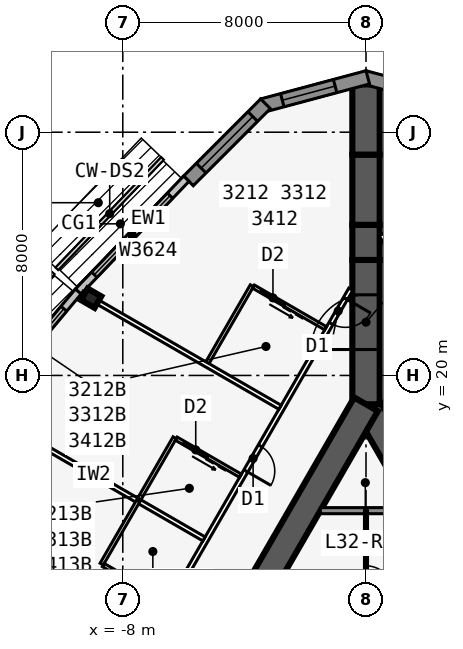
"""IFC4 building model, lengths in metres.
Left out: names, types, materials, properties, quantities, classifications, styles, units other than length and angle.
Written with IfcOpenShell. Run it as: python <this file> out.ifc"""

import sys

from ifc_helpers import new_model, si_unit, direction, frame, frame_2d, origin, origin_2d, place, context, subcontext, project, spatial, polyline, rectangle, i_section, outline, extrude, element, fill, save


model = new_model("IFC4")
c1 = context("Model", 3, precision=1e-05, world=origin(), true_north=direction((0.0, 1.0)))
c2 = subcontext(c1, "Body", "Model", "MODEL_VIEW")
j1 = project(units=[si_unit("LENGTHUNIT", "METRE"), si_unit("PLANEANGLEUNIT", "RADIAN")], contexts=[c1])
p1 = place(None, origin())
s1 = spatial("IfcSite", under=j1, at=p1, CompositionType="ELEMENT")
p2 = place(p1, origin())
s2 = spatial("IfcBuilding", under=s1, at=p2, CompositionType="ELEMENT")
p3 = place(p2, frame((0.0, 0.0, 124.9)))
s3 = spatial("IfcBuildingStorey", under=s2, at=p3, CompositionType="ELEMENT", Elevation=124.9)
p4 = place(p3, frame((16.5, -9.526, 0.0), z_axis=(0.0, 0.0, 1.0), x_axis=(-0.499999749417, 0.866025548458, 0.0)))
e1 = element("IfcWall", 1, at=p4, inside=s3, PredefinedType="SHEAR", context=c2, shape_type="SweptSolid", body=[
    extrude(rectangle(XDim=33.0, YDim=0.9, at=frame_2d((16.5, 0.0))), origin(), (0.0, 0.0, 1.0), 3.4),
])
p5 = place(p4, frame((14.15, 0.0, 0.0)))
e2 = element("IfcOpeningElement", 2, at=p5, cuts=e1, PredefinedType="OPENING", context=c2, shape_type="SweptSolid", body=[
    extrude(rectangle(XDim=1.8, YDim=2.13, at=frame_2d((0.9, 1.065))), frame((0.0, 0.46, 0.0), z_axis=(0.0, -1.0, 0.0), x_axis=(1.0, 0.0, 0.0)), (0.0, 0.0, 1.0), 0.92),
])
p6 = place(p4, frame((12.6, 0.0, 0.0)))
e3 = element("IfcOpeningElement", 3, at=p6, cuts=e1, PredefinedType="OPENING", context=c2, shape_type="SweptSolid", body=[
    extrude(rectangle(XDim=1.0, YDim=2.13, at=frame_2d((0.5, 1.065))), frame((0.0, 0.46, 0.0), z_axis=(0.0, -1.0, 0.0), x_axis=(1.0, 0.0, 0.0)), (0.0, 0.0, 1.0), 0.92),
])
p7 = place(p3, frame((0.0, 19.052, 0.0), z_axis=(0.0, 0.0, 1.0), x_axis=(-0.499999749417, -0.866025548458, 0.0)))
e4 = element("IfcWall", 4, at=p7, inside=s3, PredefinedType="SHEAR", context=c2, shape_type="SweptSolid", body=[
    extrude(rectangle(XDim=33.0, YDim=0.9, at=frame_2d((16.5, 0.0))), origin(), (0.0, 0.0, 1.0), 3.4),
])
p8 = place(p7, frame((14.15, 0.0, 0.0)))
e5 = element("IfcOpeningElement", 5, at=p8, cuts=e4, PredefinedType="OPENING", context=c2, shape_type="SweptSolid", body=[
    extrude(rectangle(XDim=1.8, YDim=2.13, at=frame_2d((0.9, 1.065))), frame((0.0, 0.46, 0.0), z_axis=(0.0, -1.0, 0.0), x_axis=(1.0, 0.0, 0.0)), (0.0, 0.0, 1.0), 0.92),
])
p9 = place(p7, frame((12.6, 0.0, 0.0)))
e6 = element("IfcOpeningElement", 6, at=p9, cuts=e4, PredefinedType="OPENING", context=c2, shape_type="SweptSolid", body=[
    extrude(rectangle(XDim=1.0, YDim=2.13, at=frame_2d((0.5, 1.065))), frame((0.0, 0.46, 0.0), z_axis=(0.0, -1.0, 0.0), x_axis=(1.0, 0.0, 0.0)), (0.0, 0.0, 1.0), 0.92),
])
p10 = place(p3, frame((0.0, 19.052, 0.0), z_axis=(0.0, 0.0, 1.0), x_axis=(0.0, 1.0, 0.0)))
e7 = element("IfcWall", 7, at=p10, inside=s3, PredefinedType="SHEAR", context=c2, shape_type="SweptSolid", body=[
    extrude(rectangle(XDim=4.746, YDim=0.9, at=frame_2d((2.373, 0.0))), origin(), (0.0, 0.0, 1.0), 3.4),
])
p11 = place(p10, frame((1.8, 0.0, 0.0)))
e8 = element("IfcOpeningElement", 8, at=p11, cuts=e7, PredefinedType="OPENING", context=c2, shape_type="SweptSolid", body=[
    extrude(rectangle(XDim=1.8, YDim=2.13, at=frame_2d((0.9, 1.065))), frame((0.0, 0.46, 0.0), z_axis=(0.0, -1.0, 0.0), x_axis=(1.0, 0.0, 0.0)), (0.0, 0.0, 1.0), 0.92),
])
p12 = place(p3, frame((0.0, 23.799, 0.0), z_axis=(0.0, 0.0, 1.0), x_axis=(0.0, 1.0, 0.0)))
e9 = element("IfcWall", 9, at=p12, inside=s3, PredefinedType="SHEAR", context=c2, shape_type="SweptSolid", body=[
    extrude(rectangle(XDim=1.155, YDim=0.9, at=frame_2d((0.577, 0.0))), origin(), (0.0, 0.0, 1.0), 3.4),
])
p13 = place(p3, frame((0.0, 24.953, 0.0), z_axis=(0.0, 0.0, 1.0), x_axis=(0.0, 1.0, 0.0)))
e10 = element("IfcWall", 10, at=p13, inside=s3, PredefinedType="SHEAR", context=c2, shape_type="SweptSolid", body=[
    extrude(rectangle(XDim=2.309, YDim=0.9, at=frame_2d((1.155, 0.0))), origin(), (0.0, 0.0, 1.0), 3.4),
])
p14 = place(p3, frame((0.0, 27.263, 0.0), z_axis=(0.0, 0.0, 1.0), x_axis=(0.0, 1.0, 0.0)))
e11 = element("IfcWall", 11, at=p14, inside=s3, PredefinedType="SHEAR", context=c2, shape_type="SweptSolid", body=[
    extrude(rectangle(XDim=2.31, YDim=0.9, at=frame_2d((1.155, 0.0))), origin(), (0.0, 0.0, 1.0), 3.4),
])
p15 = place(p3, frame((-9.041, 22.541, 0.0), z_axis=(0.0, 0.0, 1.0), x_axis=(-0.5, -0.866025403784, 0.0)))
e12 = element("IfcColumn", 12, at=p15, inside=s3, PredefinedType="COLUMN", context=c2, shape_type="SweptSolid", body=[
    extrude(i_section(OverallWidth=0.437, OverallDepth=0.513, WebThickness=0.061, FlangeThickness=0.097, at=origin_2d()), origin(), (0.0, 0.0, 1.0), 3.4),
])
p16 = place(p3, frame((3.406, 28.877, 0.0), z_axis=(0.0, 0.0, 1.0), x_axis=(-0.965924653531, 0.258823421857, 0.0)))
e13 = element("IfcWall", 13, at=p16, inside=s3, PredefinedType="SOLIDWALL", context=c2, shape_type="SweptSolid", body=[
    extrude(outline(polyline([(3.586, 0.225), (3.527, 0.225), (3.035, 0.093), (3.0, 0.225), (0.0, 0.225), (0.0, -0.225), (3.586, -0.225), (3.586, 0.225)])), origin(), (0.0, 0.0, 1.0), 3.235),
])
p17 = place(p16, frame((0.675, 0.0, 0.45)))
e14 = element("IfcOpeningElement", 14, at=p17, cuts=e13, PredefinedType="OPENING", context=c2, shape_type="SweptSolid", body=[
    extrude(rectangle(XDim=1.8, YDim=2.4, at=frame_2d((0.9, 1.2))), frame((0.0, 0.235, 0.0), z_axis=(0.0, -1.0, 0.0), x_axis=(1.0, 0.0, 0.0)), (0.0, 0.0, 1.0), 0.47),
])
p18 = place(p3, frame((0.058, 29.805, 0.0), z_axis=(0.0, 0.0, 1.0), x_axis=(-0.965924653531, -0.258823421857, 0.0)))
e15 = element("IfcWall", 15, at=p18, inside=s3, PredefinedType="SOLIDWALL", context=c2, shape_type="SweptSolid", body=[
    extrude(outline(polyline([(3.586, 0.225), (0.586, 0.225), (0.551, 0.093), (0.06, 0.225), (0.0, 0.225), (0.0, -0.225), (3.586, -0.225), (3.586, 0.225)])), origin(), (0.0, 0.0, 1.0), 3.235),
])
p19 = place(p18, frame((1.111, 0.0, 0.45)))
e16 = element("IfcOpeningElement", 16, at=p19, cuts=e15, PredefinedType="OPENING", context=c2, shape_type="SweptSolid", body=[
    extrude(rectangle(XDim=1.8, YDim=2.4, at=frame_2d((0.9, 1.2))), frame((0.0, 0.235, 0.0), z_axis=(0.0, -1.0, 0.0), x_axis=(1.0, 0.0, 0.0)), (0.0, 0.0, 1.0), 0.47),
])
p20 = place(p3, frame((-3.305, 28.935, 0.0), z_axis=(0.0, 0.0, 1.0), x_axis=(-0.707106781187, -0.707106781187, 0.0)))
e17 = element("IfcWall", 17, at=p20, inside=s3, PredefinedType="SOLIDWALL", context=c2, shape_type="SweptSolid", body=[
    extrude(rectangle(XDim=3.586, YDim=0.45, at=frame_2d((1.793, 0.0))), origin(), (0.0, 0.0, 1.0), 3.235),
])
p21 = place(p20, frame((0.593, 0.0, 0.45)))
e18 = element("IfcOpeningElement", 18, at=p21, cuts=e17, PredefinedType="OPENING", context=c2, shape_type="SweptSolid", body=[
    extrude(rectangle(XDim=2.4, YDim=2.4, at=frame_2d((1.2, 1.2))), frame((0.0, 0.235, 0.0), z_axis=(0.0, -1.0, 0.0), x_axis=(1.0, 0.0, 0.0)), (0.0, 0.0, 1.0), 0.47),
])
p22 = place(p3, frame((-5.91, 26.472, 0.0), z_axis=(0.0, 0.0, 1.0), x_axis=(-0.691719937936, -0.722165858693, 0.0)))
e19 = element("IfcWall", 19, at=p22, inside=s3, PredefinedType="STANDARD", context=c2, shape_type="SweptSolid", body=[
    extrude(rectangle(XDim=5.148, YDim=0.25, at=frame_2d((2.574, 0.0))), origin(), (0.0, 0.0, 1.0), 3.235),
])
p23 = place(p22, frame((0.774, 0.0, 0.45)))
e20 = element("IfcOpeningElement", 20, at=p23, cuts=e19, PredefinedType="OPENING", context=c2, shape_type="SweptSolid", body=[
    extrude(rectangle(XDim=3.6, YDim=2.4, at=frame_2d((1.8, 1.2))), frame((0.0, 0.135, 0.0), z_axis=(0.0, -1.0, 0.0), x_axis=(1.0, 0.0, 0.0)), (0.0, 0.0, 1.0), 0.27),
])
p24 = place(p3, frame((-9.465, 22.76, 0.0), z_axis=(0.0, 0.0, 1.0), x_axis=(-0.641810386606, -0.766863369607, 0.0)))
e21 = element("IfcWall", 21, at=p24, inside=s3, PredefinedType="STANDARD", context=c2, shape_type="SweptSolid", body=[
    extrude(rectangle(XDim=5.076, YDim=0.25, at=frame_2d((2.538, 0.0))), origin(), (0.0, 0.0, 1.0), 3.235),
])
p25 = place(p24, frame((0.738, 0.0, 0.45)))
e22 = element("IfcOpeningElement", 22, at=p25, cuts=e21, PredefinedType="OPENING", context=c2, shape_type="SweptSolid", body=[
    extrude(rectangle(XDim=3.6, YDim=2.4, at=frame_2d((1.8, 1.2))), frame((0.0, 0.135, 0.0), z_axis=(0.0, -1.0, 0.0), x_axis=(1.0, 0.0, 0.0)), (0.0, 0.0, 1.0), 0.27),
])
p26 = place(p3, frame((21.586, -11.885, 0.0), z_axis=(0.0, 0.0, 1.0), x_axis=(-0.500001915564, 0.86602429783, 0.0)))
e23 = element("IfcWall", 23, at=p26, inside=s3, PredefinedType="PARTITIONING", context=c2, shape_type="SweptSolid", body=[
    extrude(rectangle(XDim=42.172, YDim=0.15, at=frame_2d((21.086, 0.0))), origin(), (0.0, 0.0, 1.0), 3.235),
])
p27 = place(p26, frame((1.911, 0.0, 0.0)))
e24 = element("IfcOpeningElement", 24, at=p27, cuts=e23, PredefinedType="OPENING", context=c2, shape_type="SweptSolid", body=[
    extrude(rectangle(XDim=0.95, YDim=2.13, at=frame_2d((0.475, 1.065))), frame((0.0, 0.085, 0.0), z_axis=(0.0, -1.0, 0.0), x_axis=(1.0, 0.0, 0.0)), (0.0, 0.0, 1.0), 0.17),
])
p28 = place(p26, frame((7.511, 0.0, 0.0)))
e25 = element("IfcOpeningElement", 25, at=p28, cuts=e23, PredefinedType="OPENING", context=c2, shape_type="SweptSolid", body=[
    extrude(rectangle(XDim=0.95, YDim=2.13, at=frame_2d((0.475, 1.065))), frame((0.0, 0.085, 0.0), z_axis=(0.0, -1.0, 0.0), x_axis=(1.0, 0.0, 0.0)), (0.0, 0.0, 1.0), 0.17),
])
p29 = place(p26, frame((14.311, 0.0, 0.0)))
e26 = element("IfcOpeningElement", 26, at=p29, cuts=e23, PredefinedType="OPENING", context=c2, shape_type="SweptSolid", body=[
    extrude(rectangle(XDim=0.95, YDim=2.13, at=frame_2d((0.475, 1.065))), frame((0.0, 0.085, 0.0), z_axis=(0.0, -1.0, 0.0), x_axis=(1.0, 0.0, 0.0)), (0.0, 0.0, 1.0), 0.17),
])
p30 = place(p26, frame((22.511, 0.0, 0.0)))
e27 = element("IfcOpeningElement", 27, at=p30, cuts=e23, PredefinedType="OPENING", context=c2, shape_type="SweptSolid", body=[
    extrude(rectangle(XDim=0.95, YDim=2.13, at=frame_2d((0.475, 1.065))), frame((0.0, 0.085, 0.0), z_axis=(0.0, -1.0, 0.0), x_axis=(1.0, 0.0, 0.0)), (0.0, 0.0, 1.0), 0.17),
])
p31 = place(p26, frame((29.311, 0.0, 0.0)))
e28 = element("IfcOpeningElement", 28, at=p31, cuts=e23, PredefinedType="OPENING", context=c2, shape_type="SweptSolid", body=[
    extrude(rectangle(XDim=0.95, YDim=2.13, at=frame_2d((0.475, 1.065))), frame((0.0, 0.085, 0.0), z_axis=(0.0, -1.0, 0.0), x_axis=(1.0, 0.0, 0.0)), (0.0, 0.0, 1.0), 0.17),
])
p32 = place(p26, frame((39.311, 0.0, 0.0)))
e29 = element("IfcOpeningElement", 29, at=p32, cuts=e23, PredefinedType="OPENING", context=c2, shape_type="SweptSolid", body=[
    extrude(rectangle(XDim=0.95, YDim=2.13, at=frame_2d((0.475, 1.065))), frame((0.0, 0.085, 0.0), z_axis=(0.0, -1.0, 0.0), x_axis=(1.0, 0.0, 0.0)), (0.0, 0.0, 1.0), 0.17),
])
p33 = place(p3, frame((-0.5, 22.836, 0.0), z_axis=(0.0, 0.0, 1.0), x_axis=(-0.500001677587, -0.866024435227, 0.0)))
e30 = element("IfcWall", 30, at=p33, inside=s3, PredefinedType="PARTITIONING", context=c2, shape_type="SweptSolid", body=[
    extrude(rectangle(XDim=39.054, YDim=0.15, at=frame_2d((19.527, 0.0))), origin(), (0.0, 0.0, 1.0), 3.235),
])
p34 = place(p33, frame((0.352, 0.0, 0.0)))
e31 = element("IfcOpeningElement", 31, at=p34, cuts=e30, PredefinedType="OPENING", context=c2, shape_type="SweptSolid", body=[
    extrude(rectangle(XDim=0.95, YDim=2.13, at=frame_2d((0.475, 1.065))), frame((0.0, 0.085, 0.0), z_axis=(0.0, -1.0, 0.0), x_axis=(1.0, 0.0, 0.0)), (0.0, 0.0, 1.0), 0.17),
])
p35 = place(p33, frame((5.952, 0.0, 0.0)))
e32 = element("IfcOpeningElement", 32, at=p35, cuts=e30, PredefinedType="OPENING", context=c2, shape_type="SweptSolid", body=[
    extrude(rectangle(XDim=0.95, YDim=2.13, at=frame_2d((0.475, 1.065))), frame((0.0, 0.085, 0.0), z_axis=(0.0, -1.0, 0.0), x_axis=(1.0, 0.0, 0.0)), (0.0, 0.0, 1.0), 0.17),
])
p36 = place(p33, frame((12.152, 0.0, 0.0)))
e33 = element("IfcOpeningElement", 33, at=p36, cuts=e30, PredefinedType="OPENING", context=c2, shape_type="SweptSolid", body=[
    extrude(rectangle(XDim=0.95, YDim=2.13, at=frame_2d((0.475, 1.065))), frame((0.0, 0.085, 0.0), z_axis=(0.0, -1.0, 0.0), x_axis=(1.0, 0.0, 0.0)), (0.0, 0.0, 1.0), 0.17),
])
p37 = place(p33, frame((15.352, 0.0, 0.0)))
e34 = element("IfcOpeningElement", 34, at=p37, cuts=e30, PredefinedType="OPENING", context=c2, shape_type="SweptSolid", body=[
    extrude(rectangle(XDim=0.95, YDim=2.13, at=frame_2d((0.475, 1.065))), frame((0.0, 0.085, 0.0), z_axis=(0.0, -1.0, 0.0), x_axis=(1.0, 0.0, 0.0)), (0.0, 0.0, 1.0), 0.17),
])
p38 = place(p33, frame((22.152, 0.0, 0.0)))
e35 = element("IfcOpeningElement", 35, at=p38, cuts=e30, PredefinedType="OPENING", context=c2, shape_type="SweptSolid", body=[
    extrude(rectangle(XDim=0.95, YDim=2.13, at=frame_2d((0.475, 1.065))), frame((0.0, 0.085, 0.0), z_axis=(0.0, -1.0, 0.0), x_axis=(1.0, 0.0, 0.0)), (0.0, 0.0, 1.0), 0.17),
])
p39 = place(p33, frame((30.352, 0.0, 0.0)))
e36 = element("IfcOpeningElement", 36, at=p39, cuts=e30, PredefinedType="OPENING", context=c2, shape_type="SweptSolid", body=[
    extrude(rectangle(XDim=0.95, YDim=2.13, at=frame_2d((0.475, 1.065))), frame((0.0, 0.085, 0.0), z_axis=(0.0, -1.0, 0.0), x_axis=(1.0, 0.0, 0.0)), (0.0, 0.0, 1.0), 0.17),
])
p40 = place(p33, frame((37.752, 0.0, 0.0)))
e37 = element("IfcOpeningElement", 37, at=p40, cuts=e30, PredefinedType="OPENING", context=c2, shape_type="SweptSolid", body=[
    extrude(rectangle(XDim=0.95, YDim=2.13, at=frame_2d((0.475, 1.065))), frame((0.0, 0.085, 0.0), z_axis=(0.0, -1.0, 0.0), x_axis=(1.0, 0.0, 0.0)), (0.0, 0.0, 1.0), 0.17),
])
p41 = place(p3, frame((-2.829, 18.954, 0.0), z_axis=(0.0, 0.0, 1.0), x_axis=(-0.866015739374, 0.500016738876, 0.0)))
e38 = element("IfcWall", 38, at=p41, inside=s3, PredefinedType="PARTITIONING", context=c2, shape_type="SweptSolid", body=[
    extrude(rectangle(XDim=7.516, YDim=0.15, at=frame_2d((3.758, 0.0))), origin(), (0.0, 0.0, 1.0), 2.389),
])
p42 = place(p3, frame((-5.329, 14.623, 0.0), z_axis=(0.0, 0.0, 1.0), x_axis=(-0.866011723728, 0.500023693804, 0.0)))
e39 = element("IfcWall", 39, at=p42, inside=s3, PredefinedType="PARTITIONING", context=c2, shape_type="SweptSolid", body=[
    extrude(rectangle(XDim=8.395, YDim=0.15, at=frame_2d((4.198, 0.0))), origin(), (0.0, 0.0, 1.0), 2.389),
])
p43 = place(p3, frame((-7.829, 10.293, 0.0), z_axis=(0.0, 0.0, 1.0), x_axis=(-0.866027015393, 0.499997208602, 0.0)))
e40 = element("IfcWall", 40, at=p43, inside=s3, PredefinedType="PARTITIONING", context=c2, shape_type="SweptSolid", body=[
    extrude(rectangle(XDim=8.922, YDim=0.15, at=frame_2d((4.461, 0.0))), origin(), (0.0, 0.0, 1.0), 2.389),
])
p44 = place(p3, frame((-3.753, 22.952, 0.0), z_axis=(0.0, 0.0, 1.0), x_axis=(-0.499990139034, -0.866031096941, 0.0)))
e41 = element("IfcWall", 41, at=p44, inside=s3, PredefinedType="PLUMBINGWALL", context=c2, shape_type="SweptSolid", body=[
    extrude(rectangle(XDim=3.0, YDim=0.12, at=frame_2d((1.5, 0.0))), origin(), (0.0, 0.0, 1.0), 3.235),
])
p45 = place(p3, frame((-1.329, 21.552, 0.0), z_axis=(0.0, 0.0, 1.0), x_axis=(-0.865997131366, 0.500048966069, 0.0)))
e42 = element("IfcWall", 42, at=p45, inside=s3, PredefinedType="PLUMBINGWALL", context=c2, shape_type="SweptSolid", body=[
    extrude(rectangle(XDim=2.74, YDim=0.12, at=frame_2d((1.37, 0.0))), origin(), (0.0, 0.0, 1.0), 3.235),
])
p46 = place(p45, frame((1.55, 0.0, 0.0)))
e43 = element("IfcOpeningElement", 43, at=p46, cuts=e42, PredefinedType="OPENING", context=c2, shape_type="SweptSolid", body=[
    extrude(rectangle(XDim=0.9, YDim=2.13, at=frame_2d((0.45, 1.065))), frame((0.0, 0.07, 0.0), z_axis=(0.0, -1.0, 0.0), x_axis=(1.0, 0.0, 0.0)), (0.0, 0.0, 1.0), 0.14),
])
p47 = place(p3, frame((-6.293, 17.952, 0.0), z_axis=(0.0, 0.0, 1.0), x_axis=(-0.499957262057, -0.866050077142, 0.0)))
e44 = element("IfcWall", 44, at=p47, inside=s3, PredefinedType="PLUMBINGWALL", context=c2, shape_type="SweptSolid", body=[
    extrude(rectangle(XDim=2.4, YDim=0.12, at=frame_2d((1.2, 0.0))), origin(), (0.0, 0.0, 1.0), 3.235),
])
p48 = place(p3, frame((-4.128, 16.702, 0.0), z_axis=(0.0, 0.0, 1.0), x_axis=(-0.866048967903, 0.499959183527, 0.0)))
e45 = element("IfcWall", 45, at=p48, inside=s3, PredefinedType="PLUMBINGWALL", context=c2, shape_type="SweptSolid", body=[
    extrude(rectangle(XDim=2.44, YDim=0.12, at=frame_2d((1.22, 0.0))), origin(), (0.0, 0.0, 1.0), 3.235),
])
p49 = place(p48, frame((1.25, 0.0, 0.0)))
e46 = element("IfcOpeningElement", 46, at=p49, cuts=e45, PredefinedType="OPENING", context=c2, shape_type="SweptSolid", body=[
    extrude(rectangle(XDim=0.9, YDim=2.13, at=frame_2d((0.45, 1.065))), frame((0.0, 0.07, 0.0), z_axis=(0.0, -1.0, 0.0), x_axis=(1.0, 0.0, 0.0)), (0.0, 0.0, 1.0), 0.14),
])
p50 = place(p3, frame((-7.493, 15.873, 0.0), z_axis=(0.0, 0.0, 1.0), x_axis=(-0.500077600433, -0.865980596518, 0.0)))
e47 = element("IfcWall", 47, at=p50, inside=s3, PredefinedType="PLUMBINGWALL", context=c2, shape_type="SweptSolid", body=[
    extrude(rectangle(XDim=2.4, YDim=0.12, at=frame_2d((1.2, 0.0))), origin(), (0.0, 0.0, 1.0), 3.235),
])
p51 = place(p3, frame((-6.529, 12.545, 0.0), z_axis=(0.0, 0.0, 1.0), x_axis=(-0.866023955769, 0.500002508028, 0.0)))
e48 = element("IfcWall", 48, at=p51, inside=s3, PredefinedType="PLUMBINGWALL", context=c2, shape_type="SweptSolid", body=[
    extrude(rectangle(XDim=2.44, YDim=0.12, at=frame_2d((1.22, 0.0))), origin(), (0.0, 0.0, 1.0), 3.235),
])
p52 = place(p51, frame((1.25, 0.0, 0.0)))
e49 = element("IfcOpeningElement", 49, at=p52, cuts=e48, PredefinedType="OPENING", context=c2, shape_type="SweptSolid", body=[
    extrude(rectangle(XDim=0.9, YDim=2.13, at=frame_2d((0.45, 1.065))), frame((0.0, 0.07, 0.0), z_axis=(0.0, -1.0, 0.0), x_axis=(1.0, 0.0, 0.0)), (0.0, 0.0, 1.0), 0.14),
])
p53 = place(p3, frame((-1.501, 15.552, 0.0), z_axis=(0.0, 0.0, 1.0), x_axis=(1.0, 0.0, 0.0)))
e50 = element("IfcWall", 50, at=p53, inside=s3, PredefinedType="SOLIDWALL", context=c2, shape_type="SweptSolid", body=[
    extrude(rectangle(XDim=3.002, YDim=0.2, at=frame_2d((1.501, 0.0))), origin(), (0.0, 0.0, 1.0), 3.235),
])
p54 = place(p3, frame((0.0, 15.552, 0.0), z_axis=(0.0, 0.0, 1.0), x_axis=(0.0, -1.0, 0.0)))
e51 = element("IfcWall", 51, at=p54, inside=s3, PredefinedType="PARTITIONING", context=c2, shape_type="SweptSolid", body=[
    extrude(rectangle(XDim=3.775, YDim=0.1, at=frame_2d((1.888, 0.0))), origin(), (0.0, 0.0, 1.0), 3.235),
])
p55 = place(p54, frame((1.815, 0.0, 0.0)))
e52 = element("IfcOpeningElement", 52, at=p55, cuts=e51, PredefinedType="OPENING", context=c2, shape_type="SweptSolid", body=[
    extrude(rectangle(XDim=0.9, YDim=2.13, at=frame_2d((0.45, 1.065))), frame((0.0, 0.06, 0.0), z_axis=(0.0, -1.0, 0.0), x_axis=(1.0, 0.0, 0.0)), (0.0, 0.0, 1.0), 0.12),
])
p56 = place(p19, origin())
e53 = element("IfcWindow", 53, at=p56, inside=s3, PartitioningType="SINGLE_PANEL", PredefinedType="WINDOW", context=c2, shape_type="SweptSolid", body=[
    extrude(rectangle(XDim=1.8, YDim=2.4, at=frame_2d((0.9, 1.2))), frame((0.0, 0.03, 0.0), z_axis=(0.0, -1.0, 0.0), x_axis=(1.0, 0.0, 0.0)), (0.0, 0.0, 1.0), 0.06),
])
fill(e16, e53)
p57 = place(p21, origin())
e54 = element("IfcWindow", 54, at=p57, inside=s3, PartitioningType="SINGLE_PANEL", PredefinedType="WINDOW", context=c2, shape_type="SweptSolid", body=[
    extrude(rectangle(XDim=2.4, YDim=2.4, at=frame_2d((1.2, 1.2))), frame((0.0, 0.03, 0.0), z_axis=(0.0, -1.0, 0.0), x_axis=(1.0, 0.0, 0.0)), (0.0, 0.0, 1.0), 0.06),
])
fill(e18, e54)
p58 = place(p23, origin())
e55 = element("IfcWindow", 55, at=p58, inside=s3, PartitioningType="SINGLE_PANEL", PredefinedType="WINDOW", context=c2, shape_type="SweptSolid", body=[
    extrude(rectangle(XDim=3.6, YDim=2.4, at=frame_2d((1.8, 1.2))), frame((0.0, 0.03, 0.0), z_axis=(0.0, -1.0, 0.0), x_axis=(1.0, 0.0, 0.0)), (0.0, 0.0, 1.0), 0.06),
])
fill(e20, e55)
p59 = place(p25, origin())
e56 = element("IfcWindow", 56, at=p59, inside=s3, PartitioningType="SINGLE_PANEL", PredefinedType="WINDOW", context=c2, shape_type="SweptSolid", body=[
    extrude(rectangle(XDim=3.6, YDim=2.4, at=frame_2d((1.8, 1.2))), frame((0.0, 0.03, 0.0), z_axis=(0.0, -1.0, 0.0), x_axis=(1.0, 0.0, 0.0)), (0.0, 0.0, 1.0), 0.06),
])
fill(e22, e56)
p60 = place(p46, origin())
e57 = element("IfcDoor", 57, at=p60, inside=s3, OperationType="SLIDING_TO_LEFT", PredefinedType="DOOR", context=c2, shape_type="SweptSolid", body=[
    extrude(rectangle(XDim=0.9, YDim=2.13, at=frame_2d((0.45, 1.065))), frame((0.0, 0.025, 0.0), z_axis=(0.0, -1.0, 0.0), x_axis=(1.0, 0.0, 0.0)), (0.0, 0.0, 1.0), 0.05),
])
fill(e43, e57)
p61 = place(p34, origin())
e58 = element("IfcDoor", 58, at=p61, inside=s3, OperationType="SINGLE_SWING_LEFT", PredefinedType="DOOR", context=c2, shape_type="SweptSolid", body=[
    extrude(rectangle(XDim=0.95, YDim=2.13, at=frame_2d((0.475, 1.065))), frame((0.0, 0.025, 0.0), z_axis=(0.0, -1.0, 0.0), x_axis=(1.0, 0.0, 0.0)), (0.0, 0.0, 1.0), 0.05),
])
fill(e31, e58)
p62 = place(p49, origin())
e59 = element("IfcDoor", 59, at=p62, inside=s3, OperationType="SLIDING_TO_LEFT", PredefinedType="DOOR", context=c2, shape_type="SweptSolid", body=[
    extrude(rectangle(XDim=0.9, YDim=2.13, at=frame_2d((0.45, 1.065))), frame((0.0, 0.025, 0.0), z_axis=(0.0, -1.0, 0.0), x_axis=(1.0, 0.0, 0.0)), (0.0, 0.0, 1.0), 0.05),
])
fill(e46, e59)
p63 = place(p35, origin())
e60 = element("IfcDoor", 60, at=p63, inside=s3, OperationType="SINGLE_SWING_RIGHT", PredefinedType="DOOR", context=c2, shape_type="SweptSolid", body=[
    extrude(rectangle(XDim=0.95, YDim=2.13, at=frame_2d((0.475, 1.065))), frame((0.0, 0.025, 0.0), z_axis=(0.0, -1.0, 0.0), x_axis=(1.0, 0.0, 0.0)), (0.0, 0.0, 1.0), 0.05),
])
fill(e32, e60)
p64 = place(p52, origin())
e61 = element("IfcDoor", 61, at=p64, inside=s3, OperationType="SLIDING_TO_LEFT", PredefinedType="DOOR", context=c2, shape_type="SweptSolid", body=[
    extrude(rectangle(XDim=0.9, YDim=2.13, at=frame_2d((0.45, 1.065))), frame((0.0, 0.025, 0.0), z_axis=(0.0, -1.0, 0.0), x_axis=(1.0, 0.0, 0.0)), (0.0, 0.0, 1.0), 0.05),
])
fill(e49, e61)
p65 = place(p11, origin())
e62 = element("IfcDoor", 62, at=p65, inside=s3, OperationType="DOUBLE_DOOR_DOUBLE_SWING", PredefinedType="DOOR", context=c2, shape_type="SweptSolid", body=[
    extrude(rectangle(XDim=1.8, YDim=2.13, at=frame_2d((0.9, 1.065))), frame((0.0, 0.025, 0.0), z_axis=(0.0, -1.0, 0.0), x_axis=(1.0, 0.0, 0.0)), (0.0, 0.0, 1.0), 0.05),
])
fill(e8, e62)
p66 = place(p55, origin())
e63 = element("IfcDoor", 63, at=p66, inside=s3, OperationType="SINGLE_SWING_RIGHT", PredefinedType="DOOR", context=c2, shape_type="SweptSolid", body=[
    extrude(rectangle(XDim=0.9, YDim=2.13, at=frame_2d((0.45, 1.065))), frame((0.0, 0.025, 0.0), z_axis=(0.0, -1.0, 0.0), x_axis=(1.0, 0.0, 0.0)), (0.0, 0.0, 1.0), 0.05),
])
fill(e52, e63)
save(model, sys.argv[1])
